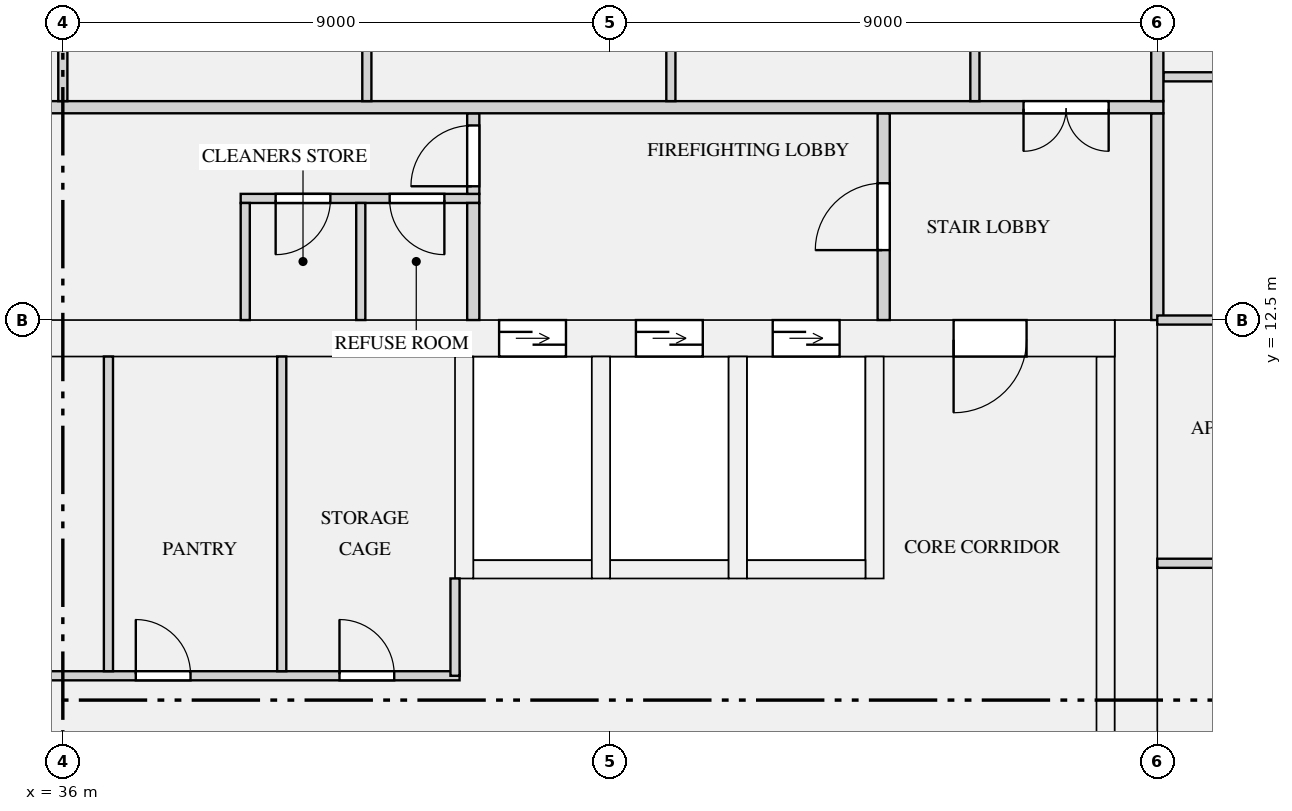
"""IFC4 building model, lengths in metres.
Left out: names, types, materials, properties, quantities, classifications, styles, units other than length and angle.
Written with IfcOpenShell. Run it as: python <this file> out.ifc"""

import sys

from ifc_helpers import new_model, si_unit, direction, frame, frame_2d, origin, place, context, subcontext, project, spatial, rectangle, extrude, element, fill, save


model = new_model("IFC4")
c1 = context("Model", 3, precision=1e-05, world=origin(), true_north=direction((0.0, 1.0)))
c2 = subcontext(c1, "Body", "Model", "MODEL_VIEW")
j1 = project(units=[si_unit("LENGTHUNIT", "METRE"), si_unit("PLANEANGLEUNIT", "RADIAN")], contexts=[c1])
p1 = place(None, origin())
s1 = spatial("IfcSite", under=j1, at=p1, CompositionType="ELEMENT")
p2 = place(p1, origin())
s2 = spatial("IfcBuilding", under=s1, at=p2, CompositionType="ELEMENT")
p3 = place(p2, frame((0.0, 0.0, 166.5)))
s3 = spatial("IfcBuildingStorey", under=s2, at=p3, CompositionType="ELEMENT", Elevation=166.5)
p4 = place(p3, frame((53.65, 0.0, 0.0), z_axis=(0.0, 0.0, 1.0), x_axis=(0.0, 1.0, 0.0)))
e1 = element("IfcWall", 1, at=p4, inside=s3, PredefinedType="SHEAR", context=c2, shape_type="SweptSolid", body=[
    extrude(rectangle(XDim=12.5, YDim=0.7, at=frame_2d((6.25, 0.0))), origin(), (0.0, 0.0, 1.0), 3.15),
])
p5 = place(p3, frame((18.7, 12.2, 0.0), z_axis=(0.0, 0.0, 1.0), x_axis=(1.0, 0.0, 0.0)))
e2 = element("IfcWall", 2, at=p5, inside=s3, PredefinedType="SHEAR", context=c2, shape_type="SweptSolid", body=[
    extrude(rectangle(XDim=34.6, YDim=0.6, at=frame_2d((17.3, 0.0))), origin(), (0.0, 0.0, 1.0), 3.15),
])
p6 = place(p5, frame((24.475, 0.0, 0.0)))
e3 = element("IfcOpeningElement", 3, at=p6, cuts=e2, PredefinedType="OPENING", context=c2, shape_type="SweptSolid", body=[
    extrude(rectangle(XDim=1.1, YDim=2.1, at=frame_2d((0.55, 1.05))), frame((0.0, 0.31, 0.0), z_axis=(0.0, -1.0, 0.0), x_axis=(1.0, 0.0, 0.0)), (0.0, 0.0, 1.0), 0.62),
])
p7 = place(p5, frame((26.725, 0.0, 0.0)))
e4 = element("IfcOpeningElement", 4, at=p7, cuts=e2, PredefinedType="OPENING", context=c2, shape_type="SweptSolid", body=[
    extrude(rectangle(XDim=1.1, YDim=2.1, at=frame_2d((0.55, 1.05))), frame((0.0, 0.31, 0.0), z_axis=(0.0, -1.0, 0.0), x_axis=(1.0, 0.0, 0.0)), (0.0, 0.0, 1.0), 0.62),
])
p8 = place(p5, frame((28.975, 0.0, 0.0)))
e5 = element("IfcOpeningElement", 5, at=p8, cuts=e2, PredefinedType="OPENING", context=c2, shape_type="SweptSolid", body=[
    extrude(rectangle(XDim=1.1, YDim=2.1, at=frame_2d((0.55, 1.05))), frame((0.0, 0.31, 0.0), z_axis=(0.0, -1.0, 0.0), x_axis=(1.0, 0.0, 0.0)), (0.0, 0.0, 1.0), 0.62),
])
p9 = place(p5, frame((8.85, 0.0, 0.0)))
e6 = element("IfcOpeningElement", 6, at=p9, cuts=e2, PredefinedType="OPENING", context=c2, shape_type="SweptSolid", body=[
    extrude(rectangle(XDim=0.9, YDim=2.1, at=frame_2d((0.45, 1.05))), frame((0.0, 0.31, 0.0), z_axis=(0.0, -1.0, 0.0), x_axis=(1.0, 0.0, 0.0)), (0.0, 0.0, 1.0), 0.62),
])
p10 = place(p5, frame((1.45, 0.0, 0.0)))
e7 = element("IfcOpeningElement", 7, at=p10, cuts=e2, PredefinedType="OPENING", context=c2, shape_type="SweptSolid", body=[
    extrude(rectangle(XDim=1.2, YDim=2.1, at=frame_2d((0.6, 1.05))), frame((0.0, 0.31, 0.0), z_axis=(0.0, -1.0, 0.0), x_axis=(1.0, 0.0, 0.0)), (0.0, 0.0, 1.0), 0.62),
])
p11 = place(p5, frame((31.95, 0.0, 0.0)))
e8 = element("IfcOpeningElement", 8, at=p11, cuts=e2, PredefinedType="OPENING", context=c2, shape_type="SweptSolid", body=[
    extrude(rectangle(XDim=1.2, YDim=2.1, at=frame_2d((0.6, 1.05))), frame((0.0, 0.31, 0.0), z_axis=(0.0, -1.0, 0.0), x_axis=(1.0, 0.0, 0.0)), (0.0, 0.0, 1.0), 0.62),
])
p12 = place(p3, frame((53.15, 1.0, 0.0), z_axis=(0.0, 0.0, 1.0), x_axis=(0.0, 1.0, 0.0)))
e9 = element("IfcWall", 9, at=p12, inside=s3, PredefinedType="SHEAR", context=c2, shape_type="SweptSolid", body=[
    extrude(rectangle(XDim=10.9, YDim=0.3, at=frame_2d((5.45, 0.0))), origin(), (0.0, 0.0, 1.0), 3.15),
])
p13 = place(p3, frame((42.75, 8.4, 0.0), z_axis=(0.0, 0.0, 1.0), x_axis=(1.0, 0.0, 0.0)))
e10 = element("IfcWall", 10, at=p13, inside=s3, PredefinedType="SHEAR", context=c2, shape_type="SweptSolid", body=[
    extrude(rectangle(XDim=1.95, YDim=0.3, at=frame_2d((0.975, 0.0))), origin(), (0.0, 0.0, 1.0), 3.15),
])
p14 = place(p3, frame((42.6, 8.25, 0.0), z_axis=(0.0, 0.0, 1.0), x_axis=(0.0, 1.0, 0.0)))
e11 = element("IfcWall", 11, at=p14, inside=s3, PredefinedType="SHEAR", context=c2, shape_type="SweptSolid", body=[
    extrude(rectangle(XDim=3.65, YDim=0.3, at=frame_2d((1.825, 0.0))), origin(), (0.0, 0.0, 1.0), 3.15),
])
p15 = place(p3, frame((45.0, 8.4, 0.0), z_axis=(0.0, 0.0, 1.0), x_axis=(1.0, 0.0, 0.0)))
e12 = element("IfcWall", 12, at=p15, inside=s3, PredefinedType="SHEAR", context=c2, shape_type="SweptSolid", body=[
    extrude(rectangle(XDim=1.95, YDim=0.3, at=frame_2d((0.975, 0.0))), origin(), (0.0, 0.0, 1.0), 3.15),
])
p16 = place(p3, frame((44.85, 8.25, 0.0), z_axis=(0.0, 0.0, 1.0), x_axis=(0.0, 1.0, 0.0)))
e13 = element("IfcWall", 13, at=p16, inside=s3, PredefinedType="SHEAR", context=c2, shape_type="SweptSolid", body=[
    extrude(rectangle(XDim=3.65, YDim=0.3, at=frame_2d((1.825, 0.0))), origin(), (0.0, 0.0, 1.0), 3.15),
])
p17 = place(p3, frame((47.25, 8.4, 0.0), z_axis=(0.0, 0.0, 1.0), x_axis=(1.0, 0.0, 0.0)))
e14 = element("IfcWall", 14, at=p17, inside=s3, PredefinedType="SHEAR", context=c2, shape_type="SweptSolid", body=[
    extrude(rectangle(XDim=1.95, YDim=0.3, at=frame_2d((0.975, 0.0))), origin(), (0.0, 0.0, 1.0), 3.15),
])
for number, where, z_axis, x_axis in (
    (15, (47.1, 8.25, 0.0), (0.0, 0.0, 1.0), (0.0, 1.0, 0.0)),
    (16, (49.35, 8.25, 0.0), (0.0, 0.0, 1.0), (0.0, 1.0, 0.0)),
):
    element("IfcWall", number, at=place(p3, frame(where, z_axis=z_axis, x_axis=x_axis)), inside=s3, PredefinedType="SHEAR", context=c2, shape_type="SweptSolid", body=[
        extrude(rectangle(XDim=3.65, YDim=0.3, at=frame_2d((1.825, 0.0))), origin(), (0.0, 0.0, 1.0), 3.15),
    ])
p18 = place(p3, frame((22.725, 6.65, 0.0), z_axis=(0.0, 0.0, 1.0), x_axis=(1.0, 0.0, 0.0)))
e17 = element("IfcWall", 17, at=p18, inside=s3, PredefinedType="PARTITIONING", context=c2, shape_type="SweptSolid", body=[
    extrude(rectangle(XDim=19.8, YDim=0.15, at=frame_2d((9.9, 0.0))), origin(), (0.0, 0.0, 1.0), 2.83),
])
p19 = place(p18, frame((0.825, 0.0, 0.0)))
e18 = element("IfcOpeningElement", 18, at=p19, cuts=e17, PredefinedType="OPENING", context=c2, shape_type="SweptSolid", body=[
    extrude(rectangle(XDim=0.9, YDim=2.1, at=frame_2d((0.45, 1.05))), frame((0.0, 0.085, 0.0), z_axis=(0.0, -1.0, 0.0), x_axis=(1.0, 0.0, 0.0)), (0.0, 0.0, 1.0), 0.17),
])
p20 = place(p18, frame((4.825, 0.0, 0.0)))
e19 = element("IfcOpeningElement", 19, at=p20, cuts=e17, PredefinedType="OPENING", context=c2, shape_type="SweptSolid", body=[
    extrude(rectangle(XDim=0.9, YDim=2.1, at=frame_2d((0.45, 1.05))), frame((0.0, 0.085, 0.0), z_axis=(0.0, -1.0, 0.0), x_axis=(1.0, 0.0, 0.0)), (0.0, 0.0, 1.0), 0.17),
])
p21 = place(p18, frame((9.825, 0.0, 0.0)))
e20 = element("IfcOpeningElement", 20, at=p21, cuts=e17, PredefinedType="OPENING", context=c2, shape_type="SweptSolid", body=[
    extrude(rectangle(XDim=0.9, YDim=2.1, at=frame_2d((0.45, 1.05))), frame((0.0, 0.085, 0.0), z_axis=(0.0, -1.0, 0.0), x_axis=(1.0, 0.0, 0.0)), (0.0, 0.0, 1.0), 0.17),
])
p22 = place(p18, frame((14.475, 0.0, 0.0)))
e21 = element("IfcOpeningElement", 21, at=p22, cuts=e17, PredefinedType="OPENING", context=c2, shape_type="SweptSolid", body=[
    extrude(rectangle(XDim=0.9, YDim=2.1, at=frame_2d((0.45, 1.05))), frame((0.0, 0.085, 0.0), z_axis=(0.0, -1.0, 0.0), x_axis=(1.0, 0.0, 0.0)), (0.0, 0.0, 1.0), 0.17),
])
p23 = place(p18, frame((17.825, 0.0, 0.0)))
e22 = element("IfcOpeningElement", 22, at=p23, cuts=e17, PredefinedType="OPENING", context=c2, shape_type="SweptSolid", body=[
    extrude(rectangle(XDim=0.9, YDim=2.1, at=frame_2d((0.45, 1.05))), frame((0.0, 0.085, 0.0), z_axis=(0.0, -1.0, 0.0), x_axis=(1.0, 0.0, 0.0)), (0.0, 0.0, 1.0), 0.17),
])
p24 = place(p3, frame((38.925, 14.5, 0.0), z_axis=(0.0, 0.0, 1.0), x_axis=(1.0, 0.0, 0.0)))
e23 = element("IfcWall", 23, at=p24, inside=s3, PredefinedType="PARTITIONING", context=c2, shape_type="SweptSolid", body=[
    extrude(rectangle(XDim=3.925, YDim=0.15, at=frame_2d((1.962, 0.0))), origin(), (0.0, 0.0, 1.0), 2.83),
])
p25 = place(p24, frame((0.575, 0.0, 0.0)))
e24 = element("IfcOpeningElement", 24, at=p25, cuts=e23, PredefinedType="OPENING", context=c2, shape_type="SweptSolid", body=[
    extrude(rectangle(XDim=0.9, YDim=2.1, at=frame_2d((0.45, 1.05))), frame((0.0, 0.085, 0.0), z_axis=(0.0, -1.0, 0.0), x_axis=(1.0, 0.0, 0.0)), (0.0, 0.0, 1.0), 0.17),
])
p26 = place(p24, frame((2.45, 0.0, 0.0)))
e25 = element("IfcOpeningElement", 25, at=p26, cuts=e23, PredefinedType="OPENING", context=c2, shape_type="SweptSolid", body=[
    extrude(rectangle(XDim=0.9, YDim=2.1, at=frame_2d((0.45, 1.05))), frame((0.0, 0.085, 0.0), z_axis=(0.0, -1.0, 0.0), x_axis=(1.0, 0.0, 0.0)), (0.0, 0.0, 1.0), 0.17),
])
p27 = place(p3, frame((42.45, 6.65, 0.0), z_axis=(0.0, 0.0, 1.0), x_axis=(0.0, 1.0, 0.0)))
e26 = element("IfcWall", 26, at=p27, inside=s3, PredefinedType="PARTITIONING", context=c2, shape_type="SweptSolid", body=[
    extrude(rectangle(XDim=1.6, YDim=0.15, at=frame_2d((0.8, 0.0))), origin(), (0.0, 0.0, 1.0), 2.83),
])
for number, where, z_axis, x_axis in (
    (27, (36.75, 6.725, 0.0), (0.0, 0.0, 1.0), (0.0, 1.0, 0.0)),
    (28, (39.6, 6.725, 0.0), (0.0, 0.0, 1.0), (0.0, 1.0, 0.0)),
):
    element("IfcWall", number, at=place(p3, frame(where, z_axis=z_axis, x_axis=x_axis)), inside=s3, PredefinedType="PARTITIONING", context=c2, shape_type="SweptSolid", body=[
        extrude(rectangle(XDim=5.175, YDim=0.15, at=frame_2d((2.587, 0.0))), origin(), (0.0, 0.0, 1.0), 2.83),
    ])
for number, where, z_axis, x_axis in (
    (29, (39.0, 12.5, 0.0), (0.0, 0.0, 1.0), (0.0, 1.0, 0.0)),
    (30, (40.9, 12.5, 0.0), (0.0, 0.0, 1.0), (0.0, 1.0, 0.0)),
):
    element("IfcWall", number, at=place(p3, frame(where, z_axis=z_axis, x_axis=x_axis)), inside=s3, PredefinedType="PARTITIONING", context=c2, shape_type="SweptSolid", body=[
        extrude(rectangle(XDim=1.925, YDim=0.15, at=frame_2d((0.962, 0.0))), origin(), (0.0, 0.0, 1.0), 2.83),
    ])
p28 = place(p3, frame((42.75, 12.5, 0.0), z_axis=(0.0, 0.0, 1.0), x_axis=(0.0, 1.0, 0.0)))
e31 = element("IfcWall", 31, at=p28, inside=s3, PredefinedType="PARTITIONING", context=c2, shape_type="SweptSolid", body=[
    extrude(rectangle(XDim=1.925, YDim=0.2, at=frame_2d((0.962, 0.0))), origin(), (0.0, 0.0, 1.0), 2.83),
])
p29 = place(p3, frame((49.5, 12.5, 0.0), z_axis=(0.0, 0.0, 1.0), x_axis=(0.0, 1.0, 0.0)))
e32 = element("IfcWall", 32, at=p29, inside=s3, PredefinedType="PARTITIONING", context=c2, shape_type="SweptSolid", body=[
    extrude(rectangle(XDim=3.4, YDim=0.2, at=frame_2d((1.7, 0.0))), origin(), (0.0, 0.0, 1.0), 2.83),
])
p30 = place(p29, frame((1.15, 0.0, 0.0)))
e33 = element("IfcOpeningElement", 33, at=p30, cuts=e32, PredefinedType="OPENING", context=c2, shape_type="SweptSolid", body=[
    extrude(rectangle(XDim=1.1, YDim=2.1, at=frame_2d((0.55, 1.05))), frame((0.0, 0.11, 0.0), z_axis=(0.0, -1.0, 0.0), x_axis=(1.0, 0.0, 0.0)), (0.0, 0.0, 1.0), 0.22),
])
p31 = place(p3, frame((54.0, 12.5, 0.0), z_axis=(0.0, 0.0, 1.0), x_axis=(0.0, 1.0, 0.0)))
e34 = element("IfcWall", 34, at=p31, inside=s3, PredefinedType="PARTITIONING", context=c2, shape_type="SweptSolid", body=[
    extrude(rectangle(XDim=3.4, YDim=0.2, at=frame_2d((1.7, 0.0))), origin(), (0.0, 0.0, 1.0), 2.83),
])
p32 = place(p3, frame((42.75, 14.575, 0.0), z_axis=(0.0, 0.0, 1.0), x_axis=(0.0, 1.0, 0.0)))
e35 = element("IfcWall", 35, at=p32, inside=s3, PredefinedType="PARTITIONING", context=c2, shape_type="SweptSolid", body=[
    extrude(rectangle(XDim=1.325, YDim=0.2, at=frame_2d((0.663, 0.0))), origin(), (0.0, 0.0, 1.0), 2.83),
])
p33 = place(p32, frame((0.125, 0.0, 0.0)))
e36 = element("IfcOpeningElement", 36, at=p33, cuts=e35, PredefinedType="OPENING", context=c2, shape_type="SweptSolid", body=[
    extrude(rectangle(XDim=1.0, YDim=2.1, at=frame_2d((0.5, 1.05))), frame((0.0, 0.11, 0.0), z_axis=(0.0, -1.0, 0.0), x_axis=(1.0, 0.0, 0.0)), (0.0, 0.0, 1.0), 0.22),
])
p34 = place(p3, frame((54.0, 8.5, 0.0), z_axis=(0.0, 0.0, 1.0), x_axis=(1.0, 0.0, 0.0)))
e37 = element("IfcWall", 37, at=p34, inside=s3, PredefinedType="PARTITIONING", context=c2, shape_type="SweptSolid", body=[
    extrude(rectangle(XDim=17.3, YDim=0.15, at=frame_2d((8.65, 0.0))), origin(), (0.0, 0.0, 1.0), 2.83),
])
p35 = place(p34, frame((1.8, 0.0, 0.0)))
e38 = element("IfcOpeningElement", 38, at=p35, cuts=e37, PredefinedType="OPENING", context=c2, shape_type="SweptSolid", body=[
    extrude(rectangle(XDim=0.9, YDim=2.1, at=frame_2d((0.45, 1.05))), frame((0.0, 0.085, 0.0), z_axis=(0.0, -1.0, 0.0), x_axis=(1.0, 0.0, 0.0)), (0.0, 0.0, 1.0), 0.17),
])
p36 = place(p34, frame((6.3, 0.0, 0.0)))
e39 = element("IfcOpeningElement", 39, at=p36, cuts=e37, PredefinedType="OPENING", context=c2, shape_type="SweptSolid", body=[
    extrude(rectangle(XDim=0.9, YDim=2.1, at=frame_2d((0.45, 1.05))), frame((0.0, 0.085, 0.0), z_axis=(0.0, -1.0, 0.0), x_axis=(1.0, 0.0, 0.0)), (0.0, 0.0, 1.0), 0.17),
])
p37 = place(p34, frame((10.8, 0.0, 0.0)))
e40 = element("IfcOpeningElement", 40, at=p37, cuts=e37, PredefinedType="OPENING", context=c2, shape_type="SweptSolid", body=[
    extrude(rectangle(XDim=0.9, YDim=2.1, at=frame_2d((0.45, 1.05))), frame((0.0, 0.085, 0.0), z_axis=(0.0, -1.0, 0.0), x_axis=(1.0, 0.0, 0.0)), (0.0, 0.0, 1.0), 0.17),
])
p38 = place(p34, frame((15.025, 0.0, 0.0)))
e41 = element("IfcOpeningElement", 41, at=p38, cuts=e37, PredefinedType="OPENING", context=c2, shape_type="SweptSolid", body=[
    extrude(rectangle(XDim=0.9, YDim=2.1, at=frame_2d((0.45, 1.05))), frame((0.0, 0.085, 0.0), z_axis=(0.0, -1.0, 0.0), x_axis=(1.0, 0.0, 0.0)), (0.0, 0.0, 1.0), 0.17),
])
p39 = place(p3, frame((54.0, 12.5, 0.0), z_axis=(0.0, 0.0, 1.0), x_axis=(1.0, 0.0, 0.0)))
e42 = element("IfcWall", 42, at=p39, inside=s3, PredefinedType="PARTITIONING", context=c2, shape_type="SweptSolid", body=[
    extrude(rectangle(XDim=17.3, YDim=0.15, at=frame_2d((8.65, 0.0))), origin(), (0.0, 0.0, 1.0), 2.83),
])
p40 = place(p39, frame((5.725, 0.0, 0.0)))
e43 = element("IfcOpeningElement", 43, at=p40, cuts=e42, PredefinedType="OPENING", context=c2, shape_type="SweptSolid", body=[
    extrude(rectangle(XDim=1.5, YDim=2.1, at=frame_2d((0.75, 1.05))), frame((0.0, 0.085, 0.0), z_axis=(0.0, -1.0, 0.0), x_axis=(1.0, 0.0, 0.0)), (0.0, 0.0, 1.0), 0.17),
])
p41 = place(p3, frame((54.1, 16.5, 0.0), z_axis=(0.0, 0.0, 1.0), x_axis=(1.0, 0.0, 0.0)))
e44 = element("IfcWall", 44, at=p41, inside=s3, PredefinedType="PARTITIONING", context=c2, shape_type="SweptSolid", body=[
    extrude(rectangle(XDim=4.325, YDim=0.15, at=frame_2d((2.163, 0.0))), origin(), (0.0, 0.0, 1.0), 2.83),
])
p42 = place(p3, frame((17.9, 16.0, 0.0), z_axis=(0.0, 0.0, 1.0), x_axis=(1.0, 0.0, 0.0)))
e45 = element("IfcWall", 45, at=p42, inside=s3, PredefinedType="PARTITIONING", context=c2, shape_type="SweptSolid", body=[
    extrude(rectangle(XDim=36.2, YDim=0.2, at=frame_2d((18.1, 0.0))), origin(), (0.0, 0.0, 1.0), 2.83),
])
p43 = place(p42, frame((0.9, 0.0, 0.0)))
e46 = element("IfcOpeningElement", 46, at=p43, cuts=e45, PredefinedType="OPENING", context=c2, shape_type="SweptSolid", body=[
    extrude(rectangle(XDim=1.4, YDim=2.1, at=frame_2d((0.7, 1.05))), frame((0.0, 0.11, 0.0), z_axis=(0.0, -1.0, 0.0), x_axis=(1.0, 0.0, 0.0)), (0.0, 0.0, 1.0), 0.22),
])
p44 = place(p42, frame((33.9, 0.0, 0.0)))
e47 = element("IfcOpeningElement", 47, at=p44, cuts=e45, PredefinedType="OPENING", context=c2, shape_type="SweptSolid", body=[
    extrude(rectangle(XDim=1.4, YDim=2.1, at=frame_2d((0.7, 1.05))), frame((0.0, 0.11, 0.0), z_axis=(0.0, -1.0, 0.0), x_axis=(1.0, 0.0, 0.0)), (0.0, 0.0, 1.0), 0.22),
])
p45 = place(p3, frame((54.0, 16.1, 0.0), z_axis=(0.0, 0.0, 1.0), x_axis=(0.0, 1.0, 0.0)))
e48 = element("IfcWall", 48, at=p45, inside=s3, PredefinedType="PARTITIONING", context=c2, shape_type="SweptSolid", body=[
    extrude(rectangle(XDim=7.8, YDim=0.2, at=frame_2d((3.9, 0.0))), origin(), (0.0, 0.0, 1.0), 2.83),
])
for number, where, z_axis, x_axis in (
    (49, (51.0, 16.1, 0.0), (0.0, 0.0, 1.0), (0.0, 1.0, 0.0)),
    (50, (36.0, 16.1, 0.0), (0.0, 0.0, 1.0), (0.0, 1.0, 0.0)),
    (51, (41.0, 16.1, 0.0), (0.0, 0.0, 1.0), (0.0, 1.0, 0.0)),
    (52, (46.0, 16.1, 0.0), (0.0, 0.0, 1.0), (0.0, 1.0, 0.0)),
):
    element("IfcWall", number, at=place(p3, frame(where, z_axis=z_axis, x_axis=x_axis)), inside=s3, PredefinedType="PARTITIONING", context=c2, shape_type="SweptSolid", body=[
        extrude(rectangle(XDim=4.825, YDim=0.15, at=frame_2d((2.413, 0.0))), origin(), (0.0, 0.0, 1.0), 2.83),
    ])
p46 = place(p6, origin())
e53 = element("IfcDoor", 53, at=p46, inside=s3, OperationType="DOUBLE_DOOR_SLIDING", PredefinedType="DOOR", context=c2, shape_type="SweptSolid", body=[
    extrude(rectangle(XDim=1.1, YDim=2.1, at=frame_2d((0.55, 1.05))), frame((0.0, 0.025, 0.0), z_axis=(0.0, -1.0, 0.0), x_axis=(1.0, 0.0, 0.0)), (0.0, 0.0, 1.0), 0.05),
])
fill(e3, e53)
p47 = place(p7, origin())
e54 = element("IfcDoor", 54, at=p47, inside=s3, OperationType="DOUBLE_DOOR_SLIDING", PredefinedType="DOOR", context=c2, shape_type="SweptSolid", body=[
    extrude(rectangle(XDim=1.1, YDim=2.1, at=frame_2d((0.55, 1.05))), frame((0.0, 0.025, 0.0), z_axis=(0.0, -1.0, 0.0), x_axis=(1.0, 0.0, 0.0)), (0.0, 0.0, 1.0), 0.05),
])
fill(e4, e54)
p48 = place(p8, origin())
e55 = element("IfcDoor", 55, at=p48, inside=s3, OperationType="DOUBLE_DOOR_SLIDING", PredefinedType="DOOR", context=c2, shape_type="SweptSolid", body=[
    extrude(rectangle(XDim=1.1, YDim=2.1, at=frame_2d((0.55, 1.05))), frame((0.0, 0.025, 0.0), z_axis=(0.0, -1.0, 0.0), x_axis=(1.0, 0.0, 0.0)), (0.0, 0.0, 1.0), 0.05),
])
fill(e5, e55)
p49 = place(p25, frame((0.9, 0.0, 0.0), z_axis=(0.0, 0.0, 1.0), x_axis=(-1.0, 0.0, 0.0)))
e56 = element("IfcDoor", 56, at=p49, inside=s3, OperationType="SINGLE_SWING_RIGHT", PredefinedType="DOOR", context=c2, shape_type="SweptSolid", body=[
    extrude(rectangle(XDim=0.9, YDim=2.1, at=frame_2d((0.45, 1.05))), frame((0.0, 0.025, 0.0), z_axis=(0.0, -1.0, 0.0), x_axis=(1.0, 0.0, 0.0)), (0.0, 0.0, 1.0), 0.05),
])
fill(e24, e56)
p50 = place(p26, frame((0.9, 0.0, 0.0), z_axis=(0.0, 0.0, 1.0), x_axis=(-1.0, 0.0, 0.0)))
e57 = element("IfcDoor", 57, at=p50, inside=s3, OperationType="SINGLE_SWING_LEFT", PredefinedType="DOOR", context=c2, shape_type="SweptSolid", body=[
    extrude(rectangle(XDim=0.9, YDim=2.1, at=frame_2d((0.45, 1.05))), frame((0.0, 0.025, 0.0), z_axis=(0.0, -1.0, 0.0), x_axis=(1.0, 0.0, 0.0)), (0.0, 0.0, 1.0), 0.05),
])
fill(e25, e57)
p51 = place(p22, origin())
e58 = element("IfcDoor", 58, at=p51, inside=s3, OperationType="SINGLE_SWING_LEFT", PredefinedType="DOOR", context=c2, shape_type="SweptSolid", body=[
    extrude(rectangle(XDim=0.9, YDim=2.1, at=frame_2d((0.45, 1.05))), frame((0.0, 0.025, 0.0), z_axis=(0.0, -1.0, 0.0), x_axis=(1.0, 0.0, 0.0)), (0.0, 0.0, 1.0), 0.05),
])
fill(e21, e58)
p52 = place(p23, origin())
e59 = element("IfcDoor", 59, at=p52, inside=s3, OperationType="SINGLE_SWING_LEFT", PredefinedType="DOOR", context=c2, shape_type="SweptSolid", body=[
    extrude(rectangle(XDim=0.9, YDim=2.1, at=frame_2d((0.45, 1.05))), frame((0.0, 0.025, 0.0), z_axis=(0.0, -1.0, 0.0), x_axis=(1.0, 0.0, 0.0)), (0.0, 0.0, 1.0), 0.05),
])
fill(e22, e59)
p53 = place(p11, frame((1.2, 0.0, 0.0), z_axis=(0.0, 0.0, 1.0), x_axis=(-1.0, 0.0, 0.0)))
e60 = element("IfcDoor", 60, at=p53, inside=s3, OperationType="SINGLE_SWING_RIGHT", PredefinedType="DOOR", context=c2, shape_type="SweptSolid", body=[
    extrude(rectangle(XDim=1.2, YDim=2.1, at=frame_2d((0.6, 1.05))), frame((0.0, 0.025, 0.0), z_axis=(0.0, -1.0, 0.0), x_axis=(1.0, 0.0, 0.0)), (0.0, 0.0, 1.0), 0.05),
])
fill(e8, e60)
p54 = place(p33, origin())
e61 = element("IfcDoor", 61, at=p54, inside=s3, OperationType="SINGLE_SWING_LEFT", PredefinedType="DOOR", context=c2, shape_type="SweptSolid", body=[
    extrude(rectangle(XDim=1.0, YDim=2.1, at=frame_2d((0.5, 1.05))), frame((0.0, 0.025, 0.0), z_axis=(0.0, -1.0, 0.0), x_axis=(1.0, 0.0, 0.0)), (0.0, 0.0, 1.0), 0.05),
])
fill(e36, e61)
p55 = place(p30, origin())
e62 = element("IfcDoor", 62, at=p55, inside=s3, OperationType="SINGLE_SWING_LEFT", PredefinedType="DOOR", context=c2, shape_type="SweptSolid", body=[
    extrude(rectangle(XDim=1.1, YDim=2.1, at=frame_2d((0.55, 1.05))), frame((0.0, 0.025, 0.0), z_axis=(0.0, -1.0, 0.0), x_axis=(1.0, 0.0, 0.0)), (0.0, 0.0, 1.0), 0.05),
])
fill(e33, e62)
p56 = place(p44, frame((1.4, 0.0, 0.0), z_axis=(0.0, 0.0, 1.0), x_axis=(-1.0, 0.0, 0.0)))
e63 = element("IfcDoor", 63, at=p56, inside=s3, OperationType="DOUBLE_DOOR_SINGLE_SWING", PredefinedType="DOOR", context=c2, shape_type="SweptSolid", body=[
    extrude(rectangle(XDim=1.4, YDim=2.1, at=frame_2d((0.7, 1.05))), frame((0.0, 0.025, 0.0), z_axis=(0.0, -1.0, 0.0), x_axis=(1.0, 0.0, 0.0)), (0.0, 0.0, 1.0), 0.05),
])
fill(e47, e63)
save(model, sys.argv[1])
